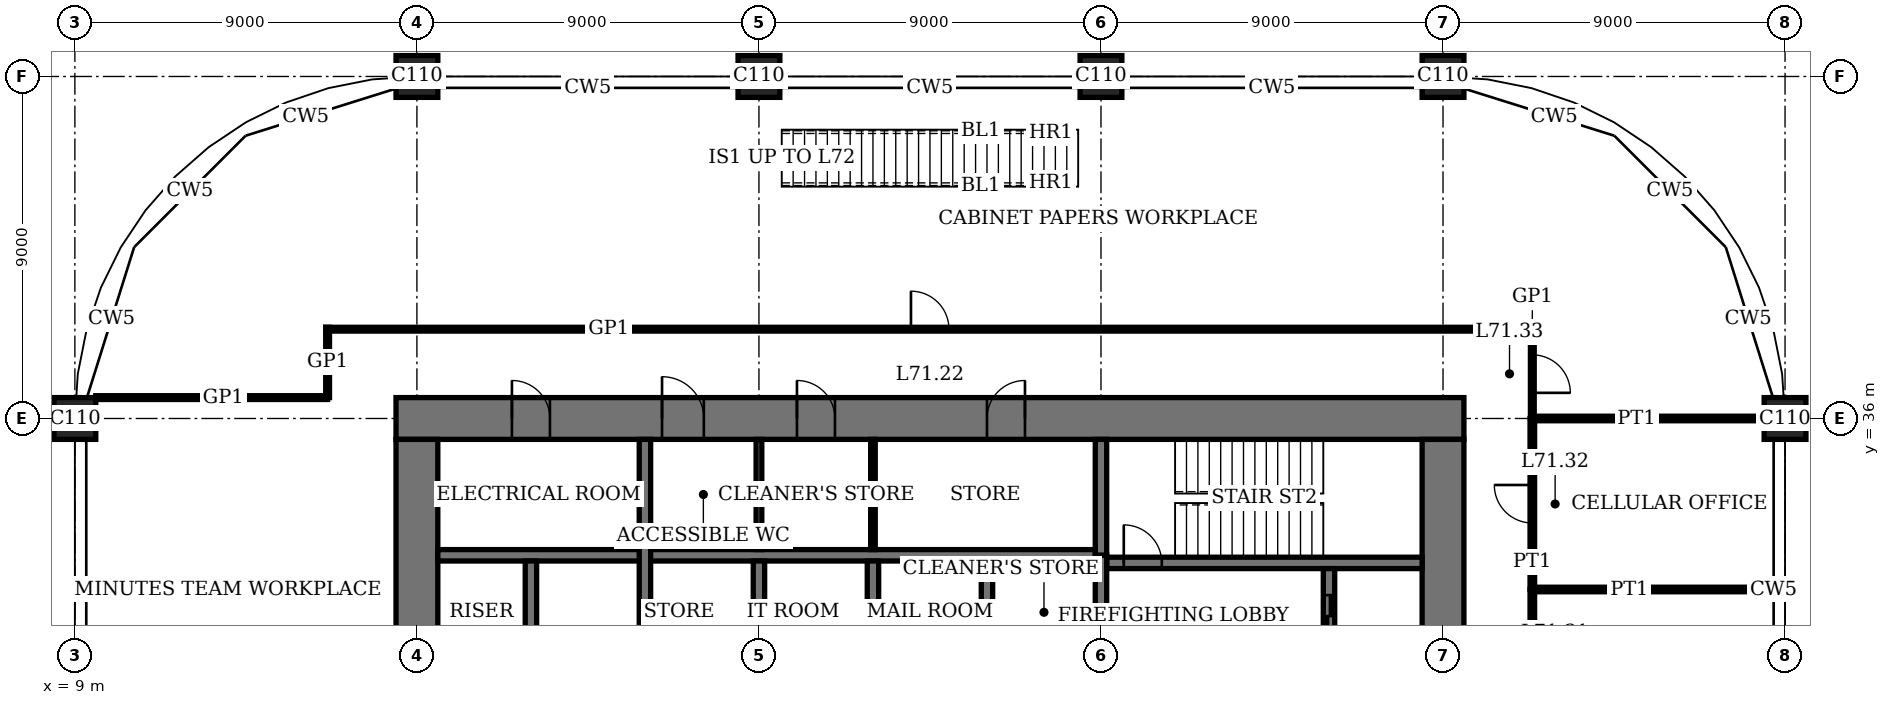
"""IFC4 building model, lengths in metres.
Left out: names, types, materials, properties, quantities, classifications, styles, units other than length and angle.
Written with IfcOpenShell. Run it as: python <this file> out.ifc"""

import sys

from ifc_helpers import new_model, si_unit, direction, frame, frame_2d, origin, origin_2d, place, context, subcontext, project, spatial, rectangle, extrude, element, fill, save


model = new_model("IFC4")
c1 = context("Model", 3, precision=1e-05, world=origin(), true_north=direction((0.0, 1.0)))
c2 = subcontext(c1, "Body", "Model", "MODEL_VIEW")
j1 = project(units=[si_unit("LENGTHUNIT", "METRE"), si_unit("PLANEANGLEUNIT", "RADIAN")], contexts=[c1])
p1 = place(None, origin())
s1 = spatial("IfcSite", under=j1, at=p1, CompositionType="ELEMENT")
p2 = place(p1, origin())
s2 = spatial("IfcBuilding", under=s1, at=p2, CompositionType="ELEMENT")
p3 = place(p2, frame((0.0, 0.0, 291.4)))
s3 = spatial("IfcBuildingStorey", under=s2, at=p3, CompositionType="ELEMENT", Elevation=291.4)
for number, where, z_axis, x_axis in (
    (1, (9.0, 36.0, 0.0), (0.0, 0.0, 1.0), (1.0, 0.0, 0.0)),
    (2, (18.0, 45.0, 0.0), (0.0, 0.0, 1.0), (1.0, 0.0, 0.0)),
    (3, (27.0, 45.0, 0.0), (0.0, 0.0, 1.0), (1.0, 0.0, 0.0)),
    (4, (36.0, 45.0, 0.0), (0.0, 0.0, 1.0), (1.0, 0.0, 0.0)),
    (5, (45.0, 45.0, 0.0), (0.0, 0.0, 1.0), (1.0, 0.0, 0.0)),
    (6, (54.0, 36.0, 0.0), (0.0, 0.0, 1.0), (1.0, 0.0, 0.0)),
):
    element("IfcColumn", number, at=place(p3, frame(where, z_axis=z_axis, x_axis=x_axis)), inside=s3, PredefinedType="COLUMN", context=c2, shape_type="SweptSolid", body=[
        extrude(rectangle(XDim=1.1, YDim=1.1, at=origin_2d()), origin(), (0.0, 0.0, 1.0), 4.0),
    ])
p4 = place(p3, frame((45.55, 36.0, 0.0), z_axis=(0.0, 0.0, 1.0), x_axis=(-1.0, 0.0, 0.0)))
e7 = element("IfcWall", 7, at=p4, inside=s3, PredefinedType="SHEAR", context=c2, shape_type="SweptSolid", body=[
    extrude(rectangle(XDim=28.1, YDim=1.1, at=frame_2d((14.05, 0.0))), origin(), (0.0, 0.0, 1.0), 4.0),
])
p5 = place(p4, frame((11.55, 0.0, 0.0)))
e8 = element("IfcOpeningElement", 8, at=p5, cuts=e7, PredefinedType="OPENING", context=c2, shape_type="SweptSolid", body=[
    extrude(rectangle(XDim=1.0, YDim=2.4, at=frame_2d((0.5, 1.2))), frame((0.0, 0.56, 0.0), z_axis=(0.0, -1.0, 0.0), x_axis=(1.0, 0.0, 0.0)), (0.0, 0.0, 1.0), 1.12),
])
p6 = place(p4, frame((16.55, 0.0, 0.0)))
e9 = element("IfcOpeningElement", 9, at=p6, cuts=e7, PredefinedType="OPENING", context=c2, shape_type="SweptSolid", body=[
    extrude(rectangle(XDim=1.0, YDim=2.4, at=frame_2d((0.5, 1.2))), frame((0.0, 0.56, 0.0), z_axis=(0.0, -1.0, 0.0), x_axis=(1.0, 0.0, 0.0)), (0.0, 0.0, 1.0), 1.12),
])
p7 = place(p4, frame((20.0, 0.0, 0.0)))
e10 = element("IfcOpeningElement", 10, at=p7, cuts=e7, PredefinedType="OPENING", context=c2, shape_type="SweptSolid", body=[
    extrude(rectangle(XDim=1.1, YDim=2.4, at=frame_2d((0.55, 1.2))), frame((0.0, 0.56, 0.0), z_axis=(0.0, -1.0, 0.0), x_axis=(1.0, 0.0, 0.0)), (0.0, 0.0, 1.0), 1.12),
])
p8 = place(p4, frame((24.05, 0.0, 0.0)))
e11 = element("IfcOpeningElement", 11, at=p8, cuts=e7, PredefinedType="OPENING", context=c2, shape_type="SweptSolid", body=[
    extrude(rectangle(XDim=1.0, YDim=2.4, at=frame_2d((0.5, 1.2))), frame((0.0, 0.56, 0.0), z_axis=(0.0, -1.0, 0.0), x_axis=(1.0, 0.0, 0.0)), (0.0, 0.0, 1.0), 1.12),
])
p9 = place(p3, frame((18.0, 35.45, 0.0), z_axis=(0.0, 0.0, 1.0), x_axis=(0.0, -1.0, 0.0)))
e12 = element("IfcWall", 12, at=p9, inside=s3, PredefinedType="SHEAR", context=c2, shape_type="SweptSolid", body=[
    extrude(rectangle(XDim=16.9, YDim=1.1, at=frame_2d((8.45, 0.0))), origin(), (0.0, 0.0, 1.0), 4.0),
])
p10 = place(p9, frame((8.45, 0.0, 0.0)))
e13 = element("IfcOpeningElement", 13, at=p10, cuts=e12, PredefinedType="OPENING", context=c2, shape_type="SweptSolid", body=[
    extrude(rectangle(XDim=1.8, YDim=2.4, at=frame_2d((0.9, 1.2))), frame((0.0, 0.56, 0.0), z_axis=(0.0, -1.0, 0.0), x_axis=(1.0, 0.0, 0.0)), (0.0, 0.0, 1.0), 1.12),
])
p11 = place(p3, frame((45.0, 18.55, 0.0), z_axis=(0.0, 0.0, 1.0), x_axis=(0.0, 1.0, 0.0)))
e14 = element("IfcWall", 14, at=p11, inside=s3, PredefinedType="SHEAR", context=c2, shape_type="SweptSolid", body=[
    extrude(rectangle(XDim=16.9, YDim=1.1, at=frame_2d((8.45, 0.0))), origin(), (0.0, 0.0, 1.0), 4.0),
])
p12 = place(p11, frame((8.45, 0.0, 0.0)))
e15 = element("IfcOpeningElement", 15, at=p12, cuts=e14, PredefinedType="OPENING", context=c2, shape_type="SweptSolid", body=[
    extrude(rectangle(XDim=1.8, YDim=2.4, at=frame_2d((0.9, 1.2))), frame((0.0, 0.56, 0.0), z_axis=(0.0, -1.0, 0.0), x_axis=(1.0, 0.0, 0.0)), (0.0, 0.0, 1.0), 1.12),
])
p13 = place(p3, frame((36.15, 32.2, 0.0), z_axis=(0.0, 0.0, 1.0), x_axis=(1.0, 0.0, 0.0)))
e16 = element("IfcWall", 16, at=p13, inside=s3, PredefinedType="SHEAR", context=c2, shape_type="SweptSolid", body=[
    extrude(rectangle(XDim=8.3, YDim=0.3, at=frame_2d((4.15, 0.0))), origin(), (0.0, 0.0, 1.0), 4.0),
])
p14 = place(p13, frame((0.45, 0.0, 0.0)))
e17 = element("IfcOpeningElement", 17, at=p14, cuts=e16, PredefinedType="OPENING", context=c2, shape_type="SweptSolid", body=[
    extrude(rectangle(XDim=1.0, YDim=2.4, at=frame_2d((0.5, 1.2))), frame((0.0, 0.16, 0.0), z_axis=(0.0, -1.0, 0.0), x_axis=(1.0, 0.0, 0.0)), (0.0, 0.0, 1.0), 0.32),
])
p15 = place(p3, frame((36.0, 32.4, 0.0), z_axis=(0.0, 0.0, 1.0), x_axis=(0.0, 1.0, 0.0)))
e18 = element("IfcWall", 18, at=p15, inside=s3, PredefinedType="SHEAR", context=c2, shape_type="SweptSolid", body=[
    extrude(rectangle(XDim=3.05, YDim=0.3, at=frame_2d((1.525, 0.0))), origin(), (0.0, 0.0, 1.0), 4.0),
])
p16 = place(p3, frame((42.0, 29.55, 0.0), z_axis=(0.0, 0.0, 1.0), x_axis=(0.0, 1.0, 0.0)))
e19 = element("IfcWall", 19, at=p16, inside=s3, PredefinedType="SHEAR", context=c2, shape_type="SweptSolid", body=[
    extrude(rectangle(XDim=2.5, YDim=0.3, at=frame_2d((1.25, 0.0))), origin(), (0.0, 0.0, 1.0), 4.0),
])
p17 = place(p16, frame((0.7, 0.0, 0.0)))
e20 = element("IfcOpeningElement", 20, at=p17, cuts=e19, PredefinedType="OPENING", context=c2, shape_type="SweptSolid", body=[
    extrude(rectangle(XDim=1.1, YDim=2.4, at=frame_2d((0.55, 1.2))), frame((0.0, 0.16, 0.0), z_axis=(0.0, -1.0, 0.0), x_axis=(1.0, 0.0, 0.0)), (0.0, 0.0, 1.0), 0.32),
])
p18 = place(p3, frame((18.55, 32.4, 0.0), z_axis=(0.0, 0.0, 1.0), x_axis=(1.0, 0.0, 0.0)))
e21 = element("IfcWall", 21, at=p18, inside=s3, PredefinedType="SHEAR", context=c2, shape_type="SweptSolid", body=[
    extrude(rectangle(XDim=17.3, YDim=0.3, at=frame_2d((8.65, 0.0))), origin(), (0.0, 0.0, 1.0), 4.0),
])
for number, where, z_axis, x_axis in (
    (22, (33.0, 29.55, 0.0), (0.0, 0.0, 1.0), (0.0, 1.0, 0.0)),
    (23, (30.0, 29.55, 0.0), (0.0, 0.0, 1.0), (0.0, 1.0, 0.0)),
    (24, (27.0, 29.55, 0.0), (0.0, 0.0, 1.0), (0.0, 1.0, 0.0)),
):
    element("IfcWall", number, at=place(p3, frame(where, z_axis=z_axis, x_axis=x_axis)), inside=s3, PredefinedType="SHEAR", context=c2, shape_type="SweptSolid", body=[
        extrude(rectangle(XDim=2.7, YDim=0.3, at=frame_2d((1.35, 0.0))), origin(), (0.0, 0.0, 1.0), 4.0),
    ])
p19 = place(p3, frame((24.0, 29.55, 0.0), z_axis=(0.0, 0.0, 1.0), x_axis=(0.0, 1.0, 0.0)))
e25 = element("IfcWall", 25, at=p19, inside=s3, PredefinedType="SHEAR", context=c2, shape_type="SweptSolid", body=[
    extrude(rectangle(XDim=5.9, YDim=0.3, at=frame_2d((2.95, 0.0))), origin(), (0.0, 0.0, 1.0), 4.0),
])
p20 = place(p3, frame((21.0, 29.55, 0.0), z_axis=(0.0, 0.0, 1.0), x_axis=(0.0, 1.0, 0.0)))
e26 = element("IfcWall", 26, at=p20, inside=s3, PredefinedType="SHEAR", context=c2, shape_type="SweptSolid", body=[
    extrude(rectangle(XDim=2.7, YDim=0.3, at=frame_2d((1.35, 0.0))), origin(), (0.0, 0.0, 1.0), 4.0),
])
p21 = place(p3, frame((36.0, 29.55, 0.0), z_axis=(0.0, 0.0, 1.0), x_axis=(0.0, 1.0, 0.0)))
e27 = element("IfcWall", 27, at=p21, inside=s3, PredefinedType="SHEAR", context=c2, shape_type="SweptSolid", body=[
    extrude(rectangle(XDim=2.85, YDim=0.3, at=frame_2d((1.425, 0.0))), origin(), (0.0, 0.0, 1.0), 4.0),
])
p22 = place(p3, frame((47.35, 31.5, 0.0), z_axis=(0.0, 0.0, 1.0), x_axis=(1.0, 0.0, 0.0)))
e28 = element("IfcWall", 28, at=p22, inside=s3, PredefinedType="PARTITIONING", context=c2, shape_type="SweptSolid", body=[
    extrude(rectangle(XDim=6.34, YDim=0.12, at=frame_2d((3.17, 0.0))), origin(), (0.0, 0.0, 1.0), 3.1),
])
p23 = place(p3, frame((47.35, 36.0, 0.0), z_axis=(0.0, 0.0, 1.0), x_axis=(1.0, 0.0, 0.0)))
e29 = element("IfcWall", 29, at=p23, inside=s3, PredefinedType="PARTITIONING", context=c2, shape_type="SweptSolid", body=[
    extrude(rectangle(XDim=6.1, YDim=0.12, at=frame_2d((3.05, 0.0))), origin(), (0.0, 0.0, 1.0), 3.05),
])
p24 = place(p3, frame((9.55, 36.55, 0.0), z_axis=(0.0, 0.0, 1.0), x_axis=(1.0, 0.0, 0.0)))
e30 = element("IfcWall", 30, at=p24, inside=s3, PredefinedType="PARTITIONING", context=c2, shape_type="SweptSolid", body=[
    extrude(rectangle(XDim=6.1, YDim=0.1, at=frame_2d((3.05, 0.0))), origin(), (0.0, 0.0, 1.0), 3.75),
])
p25 = place(p3, frame((15.6, 38.35, 0.0), z_axis=(0.0, 0.0, 1.0), x_axis=(1.0, 0.0, 0.0)))
e31 = element("IfcWall", 31, at=p25, inside=s3, PredefinedType="PARTITIONING", context=c2, shape_type="SweptSolid", body=[
    extrude(rectangle(XDim=31.8, YDim=0.1, at=frame_2d((15.9, 0.0))), origin(), (0.0, 0.0, 1.0), 3.75),
])
p26 = place(p25, frame((15.4, 0.0, 0.0)))
e32 = element("IfcOpeningElement", 32, at=p26, cuts=e31, PredefinedType="OPENING", context=c2, shape_type="SweptSolid", body=[
    extrude(rectangle(XDim=1.0, YDim=2.4, at=frame_2d((0.5, 1.2))), frame((0.0, 0.06, 0.0), z_axis=(0.0, -1.0, 0.0), x_axis=(1.0, 0.0, 0.0)), (0.0, 0.0, 1.0), 0.12),
])
p27 = place(p3, frame((15.65, 36.55, 0.0), z_axis=(0.0, 0.0, 1.0), x_axis=(0.0, 1.0, 0.0)))
e33 = element("IfcWall", 33, at=p27, inside=s3, PredefinedType="PARTITIONING", context=c2, shape_type="SweptSolid", body=[
    extrude(rectangle(XDim=1.85, YDim=0.1, at=frame_2d((0.925, 0.0))), origin(), (0.0, 0.0, 1.0), 3.75),
])
p28 = place(p3, frame((47.35, 27.0, 0.0), z_axis=(0.0, 0.0, 1.0), x_axis=(0.0, 1.0, 0.0)))
e34 = element("IfcWall", 34, at=p28, inside=s3, PredefinedType="PARTITIONING", context=c2, shape_type="SweptSolid", body=[
    extrude(rectangle(XDim=4.5, YDim=0.12, at=frame_2d((2.25, 0.0))), origin(), (0.0, 0.0, 1.0), 3.75),
])
p29 = place(p28, frame((1.75, 0.0, 0.0)))
e35 = element("IfcOpeningElement", 35, at=p29, cuts=e34, PredefinedType="OPENING", context=c2, shape_type="SweptSolid", body=[
    extrude(rectangle(XDim=1.0, YDim=2.4, at=frame_2d((0.5, 1.2))), frame((0.0, 0.07, 0.0), z_axis=(0.0, -1.0, 0.0), x_axis=(1.0, 0.0, 0.0)), (0.0, 0.0, 1.0), 0.14),
])
p30 = place(p3, frame((47.35, 31.5, 0.0), z_axis=(0.0, 0.0, 1.0), x_axis=(0.0, 1.0, 0.0)))
e36 = element("IfcWall", 36, at=p30, inside=s3, PredefinedType="PARTITIONING", context=c2, shape_type="SweptSolid", body=[
    extrude(rectangle(XDim=4.5, YDim=0.12, at=frame_2d((2.25, 0.0))), origin(), (0.0, 0.0, 1.0), 3.75),
])
p31 = place(p30, frame((1.75, 0.0, 0.0)))
e37 = element("IfcOpeningElement", 37, at=p31, cuts=e36, PredefinedType="OPENING", context=c2, shape_type="SweptSolid", body=[
    extrude(rectangle(XDim=1.0, YDim=2.4, at=frame_2d((0.5, 1.2))), frame((0.0, 0.07, 0.0), z_axis=(0.0, -1.0, 0.0), x_axis=(1.0, 0.0, 0.0)), (0.0, 0.0, 1.0), 0.14),
])
p32 = place(p3, frame((47.35, 36.0, 0.0), z_axis=(0.0, 0.0, 1.0), x_axis=(0.0, 1.0, 0.0)))
e38 = element("IfcWall", 38, at=p32, inside=s3, PredefinedType="PARTITIONING", context=c2, shape_type="SweptSolid", body=[
    extrude(rectangle(XDim=2.35, YDim=0.1, at=frame_2d((1.175, 0.0))), origin(), (0.0, 0.0, 1.0), 3.75),
])
p33 = place(p32, frame((0.675, 0.0, 0.0)))
e39 = element("IfcOpeningElement", 39, at=p33, cuts=e38, PredefinedType="OPENING", context=c2, shape_type="SweptSolid", body=[
    extrude(rectangle(XDim=1.0, YDim=2.4, at=frame_2d((0.5, 1.2))), frame((0.0, 0.06, 0.0), z_axis=(0.0, -1.0, 0.0), x_axis=(1.0, 0.0, 0.0)), (0.0, 0.0, 1.0), 0.12),
])
p34 = place(p3, frame((30.0, 32.55, 0.0), z_axis=(0.0, 0.0, 1.0), x_axis=(0.0, 1.0, 0.0)))
e40 = element("IfcWall", 40, at=p34, inside=s3, PredefinedType="PARTITIONING", context=c2, shape_type="SweptSolid", body=[
    extrude(rectangle(XDim=2.9, YDim=0.12, at=frame_2d((1.45, 0.0))), origin(), (0.0, 0.0, 1.0), 3.75),
])
p35 = place(p3, frame((27.0, 32.55, 0.0), z_axis=(0.0, 0.0, 1.0), x_axis=(0.0, 1.0, 0.0)))
e41 = element("IfcWall", 41, at=p35, inside=s3, PredefinedType="PARTITIONING", context=c2, shape_type="SweptSolid", body=[
    extrude(rectangle(XDim=2.9, YDim=0.15, at=frame_2d((1.45, 0.0))), origin(), (0.0, 0.0, 1.0), 3.75),
])
p36 = place(p5, origin())
e42 = element("IfcDoor", 42, at=p36, inside=s3, OperationType="SINGLE_SWING_LEFT", PredefinedType="DOOR", context=c2, shape_type="SweptSolid", body=[
    extrude(rectangle(XDim=1.0, YDim=2.4, at=frame_2d((0.5, 1.2))), frame((0.0, 0.025, 0.0), z_axis=(0.0, -1.0, 0.0), x_axis=(1.0, 0.0, 0.0)), (0.0, 0.0, 1.0), 0.05),
    extrude(rectangle(XDim=0.04, YDim=2.4, at=frame_2d((0.02, 1.2))), frame((0.0, 0.4, 0.0), z_axis=(0.0, -1.0, 0.0), x_axis=(1.0, 0.0, 0.0)), (0.0, 0.0, 1.0), 0.8),
    extrude(rectangle(XDim=0.04, YDim=2.4, at=frame_2d((0.98, 1.2))), frame((0.0, 0.4, 0.0), z_axis=(0.0, -1.0, 0.0), x_axis=(1.0, 0.0, 0.0)), (0.0, 0.0, 1.0), 0.8),
    extrude(rectangle(XDim=1.0, YDim=0.04, at=frame_2d((0.5, 2.38))), frame((0.0, 0.4, 0.0), z_axis=(0.0, -1.0, 0.0), x_axis=(1.0, 0.0, 0.0)), (0.0, 0.0, 1.0), 0.8),
])
fill(e8, e42)
p37 = place(p6, origin())
e43 = element("IfcDoor", 43, at=p37, inside=s3, OperationType="SINGLE_SWING_RIGHT", PredefinedType="DOOR", context=c2, shape_type="SweptSolid", body=[
    extrude(rectangle(XDim=1.0, YDim=2.4, at=frame_2d((0.5, 1.2))), frame((0.0, 0.025, 0.0), z_axis=(0.0, -1.0, 0.0), x_axis=(1.0, 0.0, 0.0)), (0.0, 0.0, 1.0), 0.05),
    extrude(rectangle(XDim=0.04, YDim=2.4, at=frame_2d((0.02, 1.2))), frame((0.0, 0.4, 0.0), z_axis=(0.0, -1.0, 0.0), x_axis=(1.0, 0.0, 0.0)), (0.0, 0.0, 1.0), 0.8),
    extrude(rectangle(XDim=0.04, YDim=2.4, at=frame_2d((0.98, 1.2))), frame((0.0, 0.4, 0.0), z_axis=(0.0, -1.0, 0.0), x_axis=(1.0, 0.0, 0.0)), (0.0, 0.0, 1.0), 0.8),
    extrude(rectangle(XDim=1.0, YDim=0.04, at=frame_2d((0.5, 2.38))), frame((0.0, 0.4, 0.0), z_axis=(0.0, -1.0, 0.0), x_axis=(1.0, 0.0, 0.0)), (0.0, 0.0, 1.0), 0.8),
])
fill(e9, e43)
p38 = place(p7, origin())
e44 = element("IfcDoor", 44, at=p38, inside=s3, OperationType="SINGLE_SWING_RIGHT", PredefinedType="DOOR", context=c2, shape_type="SweptSolid", body=[
    extrude(rectangle(XDim=1.1, YDim=2.4, at=frame_2d((0.55, 1.2))), frame((0.0, 0.025, 0.0), z_axis=(0.0, -1.0, 0.0), x_axis=(1.0, 0.0, 0.0)), (0.0, 0.0, 1.0), 0.05),
    extrude(rectangle(XDim=0.04, YDim=2.4, at=frame_2d((0.02, 1.2))), frame((0.0, 0.44, 0.0), z_axis=(0.0, -1.0, 0.0), x_axis=(1.0, 0.0, 0.0)), (0.0, 0.0, 1.0), 0.88),
    extrude(rectangle(XDim=0.04, YDim=2.4, at=frame_2d((1.08, 1.2))), frame((0.0, 0.44, 0.0), z_axis=(0.0, -1.0, 0.0), x_axis=(1.0, 0.0, 0.0)), (0.0, 0.0, 1.0), 0.88),
    extrude(rectangle(XDim=1.1, YDim=0.04, at=frame_2d((0.55, 2.38))), frame((0.0, 0.44, 0.0), z_axis=(0.0, -1.0, 0.0), x_axis=(1.0, 0.0, 0.0)), (0.0, 0.0, 1.0), 0.88),
])
fill(e10, e44)
p39 = place(p8, origin())
e45 = element("IfcDoor", 45, at=p39, inside=s3, OperationType="SINGLE_SWING_RIGHT", PredefinedType="DOOR", context=c2, shape_type="SweptSolid", body=[
    extrude(rectangle(XDim=1.0, YDim=2.4, at=frame_2d((0.5, 1.2))), frame((0.0, 0.025, 0.0), z_axis=(0.0, -1.0, 0.0), x_axis=(1.0, 0.0, 0.0)), (0.0, 0.0, 1.0), 0.05),
    extrude(rectangle(XDim=0.04, YDim=2.4, at=frame_2d((0.02, 1.2))), frame((0.0, 0.4, 0.0), z_axis=(0.0, -1.0, 0.0), x_axis=(1.0, 0.0, 0.0)), (0.0, 0.0, 1.0), 0.8),
    extrude(rectangle(XDim=0.04, YDim=2.4, at=frame_2d((0.98, 1.2))), frame((0.0, 0.4, 0.0), z_axis=(0.0, -1.0, 0.0), x_axis=(1.0, 0.0, 0.0)), (0.0, 0.0, 1.0), 0.8),
    extrude(rectangle(XDim=1.0, YDim=0.04, at=frame_2d((0.5, 2.38))), frame((0.0, 0.4, 0.0), z_axis=(0.0, -1.0, 0.0), x_axis=(1.0, 0.0, 0.0)), (0.0, 0.0, 1.0), 0.8),
])
fill(e11, e45)
p40 = place(p14, origin())
e46 = element("IfcDoor", 46, at=p40, inside=s3, OperationType="SINGLE_SWING_RIGHT", PredefinedType="DOOR", context=c2, shape_type="SweptSolid", body=[
    extrude(rectangle(XDim=1.0, YDim=2.4, at=frame_2d((0.5, 1.2))), frame((0.0, 0.03, 0.0), z_axis=(0.0, -1.0, 0.0), x_axis=(1.0, 0.0, 0.0)), (0.0, 0.0, 1.0), 0.06),
])
fill(e17, e46)
p41 = place(p26, origin())
e47 = element("IfcDoor", 47, at=p41, inside=s3, OperationType="SINGLE_SWING_RIGHT", PredefinedType="DOOR", context=c2, shape_type="SweptSolid", body=[
    extrude(rectangle(XDim=1.0, YDim=2.4, at=frame_2d((0.5, 1.2))), frame((0.0, 0.02, 0.0), z_axis=(0.0, -1.0, 0.0), x_axis=(1.0, 0.0, 0.0)), (0.0, 0.0, 1.0), 0.04),
])
fill(e32, e47)
p42 = place(p31, origin())
e48 = element("IfcDoor", 48, at=p42, inside=s3, OperationType="SINGLE_SWING_LEFT", PredefinedType="DOOR", context=c2, shape_type="SweptSolid", body=[
    extrude(rectangle(XDim=1.0, YDim=2.4, at=frame_2d((0.5, 1.2))), frame((0.0, 0.025, 0.0), z_axis=(0.0, -1.0, 0.0), x_axis=(1.0, 0.0, 0.0)), (0.0, 0.0, 1.0), 0.05),
])
fill(e37, e48)
p43 = place(p33, origin())
e49 = element("IfcDoor", 49, at=p43, inside=s3, OperationType="SINGLE_SWING_LEFT", PredefinedType="DOOR", context=c2, shape_type="SweptSolid", body=[
    extrude(rectangle(XDim=1.0, YDim=2.4, at=frame_2d((0.5, 1.2))), frame((0.0, 0.02, 0.0), z_axis=(0.0, -1.0, 0.0), x_axis=(1.0, 0.0, 0.0)), (0.0, 0.0, 1.0), 0.04),
])
fill(e39, e49)
p44 = place(p17, origin())
e50 = element("IfcDoor", 50, at=p44, inside=s3, OperationType="DOUBLE_DOOR_SLIDING", PredefinedType="DOOR", context=c2, shape_type="SweptSolid", body=[
    extrude(rectangle(XDim=1.1, YDim=2.4, at=frame_2d((0.55, 1.2))), frame((0.0, 0.03, 0.0), z_axis=(0.0, -1.0, 0.0), x_axis=(1.0, 0.0, 0.0)), (0.0, 0.0, 1.0), 0.06),
])
fill(e20, e50)
save(model, sys.argv[1])
